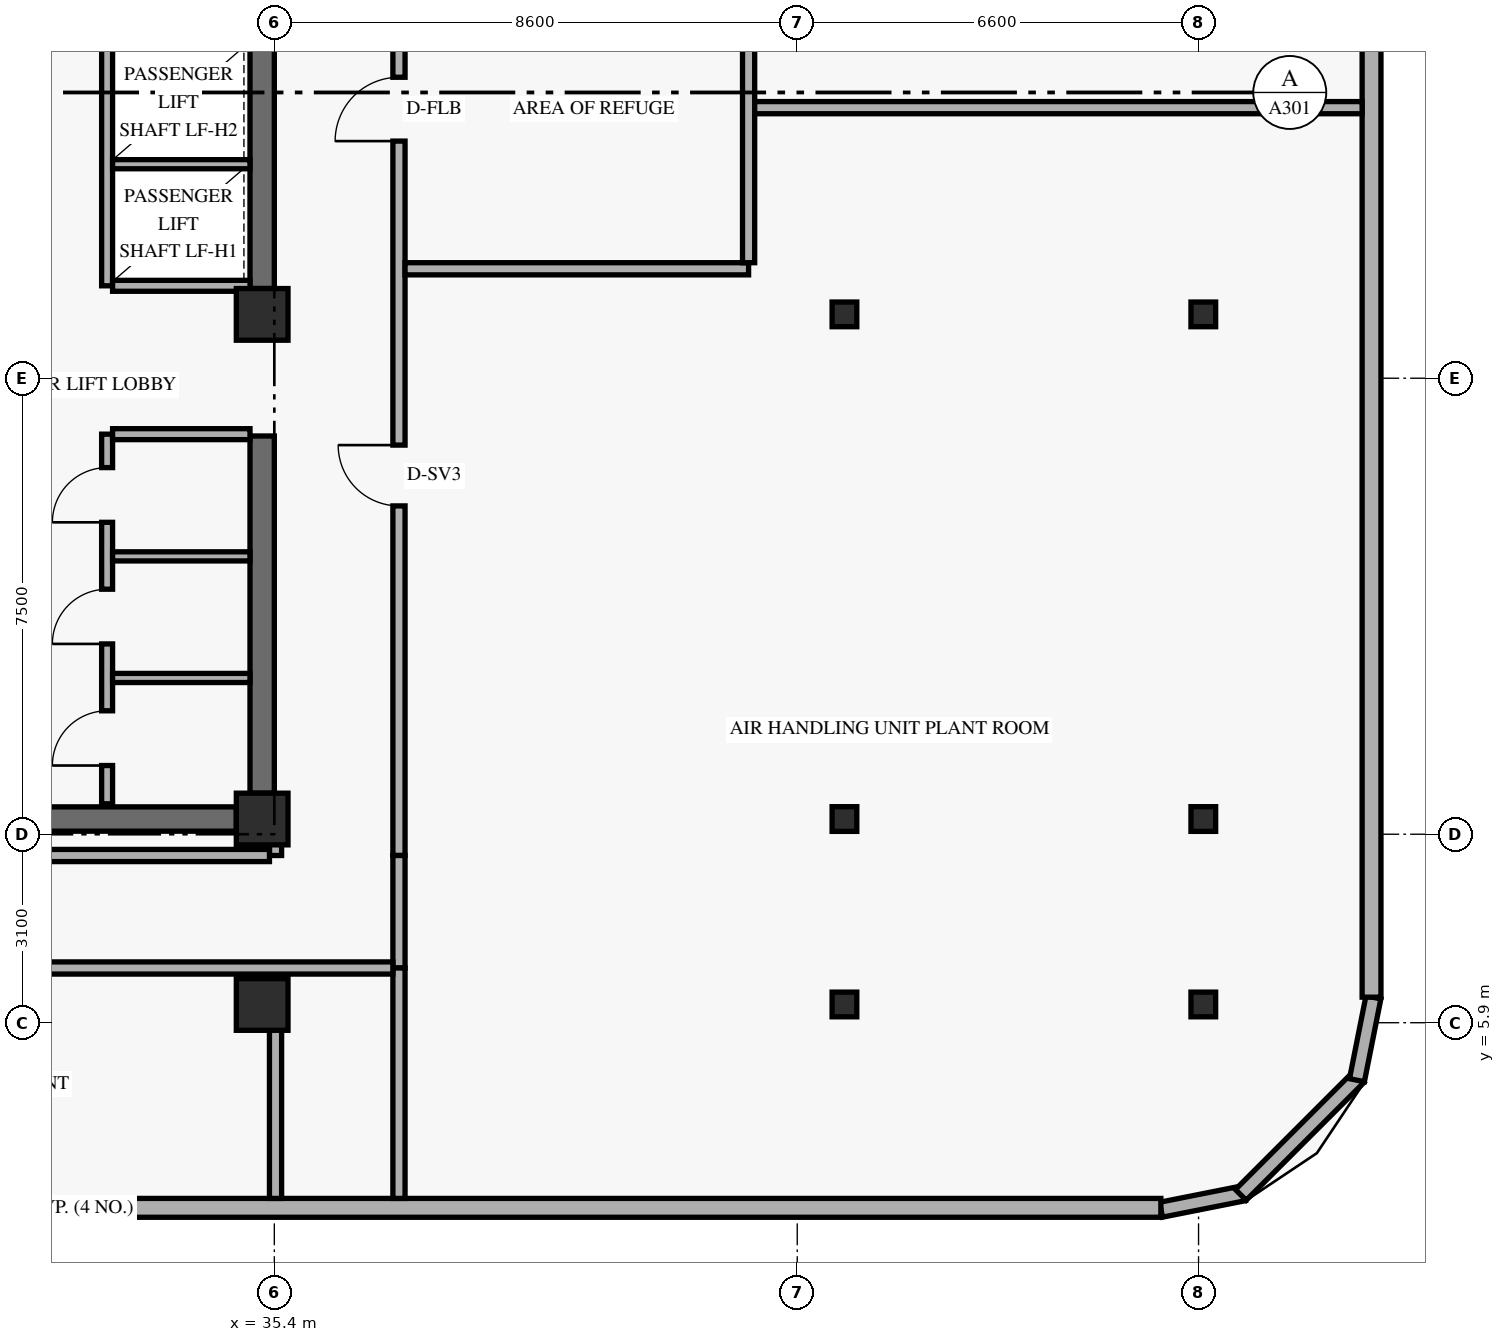
"""IFC4 building model, lengths in metres.
Left out: names, types, materials, properties, quantities, classifications, styles, units other than length and angle.
Written with IfcOpenShell. Run it as: python <this file> out.ifc"""

import sys

from ifc_helpers import new_model, si_unit, direction, frame, frame_2d, origin, origin_2d, place, context, subcontext, project, spatial, rectangle, hollow_rectangle, extrude, element, fill, save


model = new_model("IFC4")
c1 = context("Model", 3, precision=1e-05, world=origin(), true_north=direction((0.0, 1.0)))
c2 = subcontext(c1, "Body", "Model", "MODEL_VIEW")
j1 = project(units=[si_unit("LENGTHUNIT", "METRE"), si_unit("PLANEANGLEUNIT", "RADIAN")], contexts=[c1])
p1 = place(None, origin())
s1 = spatial("IfcSite", under=j1, at=p1, CompositionType="ELEMENT")
p2 = place(p1, origin())
s2 = spatial("IfcBuilding", under=s1, at=p2, CompositionType="ELEMENT")
p3 = place(p2, frame((0.0, 0.0, 135.6)))
s3 = spatial("IfcBuildingStorey", under=s2, at=p3, CompositionType="ELEMENT", Elevation=135.6)
p4 = place(p3, frame((35.2, 9.675, 0.0), z_axis=(0.0, 0.0, 1.0), x_axis=(0.0, 1.0, 0.0)))
e1 = element("IfcWall", 1, at=p4, inside=s3, PredefinedType="SHEAR", context=c2, shape_type="SweptSolid", body=[
    extrude(rectangle(XDim=5.875, YDim=0.4, at=frame_2d((2.938, 0.0))), origin(), (0.0, 0.0, 1.0), 4.549),
])
p5 = place(p3, frame((35.2, 17.975, 0.0), z_axis=(0.0, 0.0, 1.0), x_axis=(0.0, 1.0, 0.0)))
e2 = element("IfcWall", 2, at=p5, inside=s3, PredefinedType="SHEAR", context=c2, shape_type="SweptSolid", body=[
    extrude(rectangle(XDim=10.125, YDim=0.4, at=frame_2d((5.062, 0.0))), origin(), (0.0, 0.0, 1.0), 4.549),
])
p6 = place(p3, frame((24.625, 9.25, 0.0), z_axis=(0.0, 0.0, 1.0), x_axis=(1.0, 0.0, 0.0)))
e3 = element("IfcWall", 3, at=p6, inside=s3, PredefinedType="SHEAR", context=c2, shape_type="SweptSolid", body=[
    extrude(rectangle(XDim=10.15, YDim=0.4, at=frame_2d((5.075, 0.0))), origin(), (0.0, 0.0, 1.0), 5.16),
])
for number, where, z_axis, x_axis in (
    (4, (35.2, 6.2, 0.0), (0.0, 0.0, 1.0), (1.0, 0.0, 0.0)),
    (5, (35.2, 9.25, 0.0), (0.0, 0.0, 1.0), (1.0, 0.0, 0.0)),
    (6, (35.2, 17.55, 0.0), (0.0, 0.0, 1.0), (1.0, 0.0, 0.0)),
):
    element("IfcColumn", number, at=place(p3, frame(where, z_axis=z_axis, x_axis=x_axis)), inside=s3, PredefinedType="COLUMN", context=c2, shape_type="SweptSolid", body=[
        extrude(rectangle(XDim=0.85, YDim=0.85, at=origin_2d()), origin(), (0.0, 0.0, 1.0), 5.4),
    ])
for number, where, z_axis, x_axis in (
    (7, (44.682, 6.2, 0.0), (0.035, 0.0, 0.999), (0.0, 1.0, 0.0)),
    (8, (44.682, 9.25, 0.0), (0.035, 0.0, 0.999), (0.0, 1.0, 0.0)),
    (9, (44.682, 17.55, 0.0), (0.035, 0.0, 0.999), (0.0, 1.0, 0.0)),
):
    element("IfcColumn", number, at=place(p3, frame(where, z_axis=z_axis, x_axis=x_axis)), inside=s3, PredefinedType="COLUMN", context=c2, shape_type="SweptSolid", body=[
        extrude(hollow_rectangle(XDim=0.406, YDim=0.406, WallThickness=0.016, at=origin_2d()), origin(), (0.0, 0.0, 1.0), 5.403),
    ])
for number, where, z_axis, x_axis in (
    (10, (50.521, 6.2, 0.0), (0.058, 0.0, 0.998), (0.0, 1.0, 0.0)),
    (11, (50.521, 9.25, 0.0), (0.058, 0.0, 0.998), (0.0, 1.0, 0.0)),
    (12, (50.521, 17.55, 0.0), (0.058, 0.0, 0.998), (0.0, 1.0, 0.0)),
):
    element("IfcColumn", number, at=place(p3, frame(where, z_axis=z_axis, x_axis=x_axis)), inside=s3, PredefinedType="COLUMN", context=c2, shape_type="SweptSolid", body=[
        extrude(hollow_rectangle(XDim=0.406, YDim=0.406, WallThickness=0.016, at=origin_2d()), origin(), (0.0, 0.0, 1.0), 5.409),
    ])
p7 = place(p3, frame((49.983, 2.824, 0.0), z_axis=(0.0, 0.0, 1.0), x_axis=(0.980809899341, 0.19496651342, 0.0)))
e13 = element("IfcWall", 13, at=p7, inside=s3, PredefinedType="SOLIDWALL", context=c2, shape_type="SweptSolid", body=[
    extrude(rectangle(XDim=1.389, YDim=0.25, at=frame_2d((0.694, 0.0))), origin(), (0.0, 0.0, 1.0), 5.16),
])
p8 = place(p3, frame((51.295, 3.068, 0.0), z_axis=(0.0, 0.0, 1.0), x_axis=(0.707151344399, 0.707062215165, 0.0)))
e14 = element("IfcWall", 14, at=p8, inside=s3, PredefinedType="SOLIDWALL", context=c2, shape_type="SweptSolid", body=[
    extrude(rectangle(XDim=2.739, YDim=0.25, at=frame_2d((1.37, 0.0))), origin(), (0.0, 0.0, 1.0), 5.16),
])
p9 = place(p3, frame((53.205, 4.955, 0.0), z_axis=(0.0, 0.0, 1.0), x_axis=(0.195000137217, 0.980803214965, 0.0)))
e15 = element("IfcWall", 15, at=p9, inside=s3, PredefinedType="SOLIDWALL", context=c2, shape_type="SweptSolid", body=[
    extrude(rectangle(XDim=1.388, YDim=0.25, at=frame_2d((0.694, 0.0))), origin(), (0.0, 0.0, 1.0), 5.16),
])
p10 = place(p3, frame((13.42, 2.855, 0.0), z_axis=(0.0, 0.0, 1.0), x_axis=(1.0, 0.0, 0.0)))
e16 = element("IfcWall", 16, at=p10, inside=s3, PredefinedType="SOLIDWALL", context=c2, shape_type="SweptSolid", body=[
    extrude(rectangle(XDim=36.56, YDim=0.31, at=frame_2d((18.28, 0.0))), origin(), (0.0, 0.0, 1.0), 5.16),
])
p11 = place(p3, frame((53.445, 6.32, 0.0), z_axis=(0.0, 0.0, 1.0), x_axis=(0.0, 1.0, 0.0)))
e17 = element("IfcWall", 17, at=p11, inside=s3, PredefinedType="SOLIDWALL", context=c2, shape_type="SweptSolid", body=[
    extrude(rectangle(XDim=35.36, YDim=0.31, at=frame_2d((17.68, 0.0))), origin(), (0.0, 0.0, 1.0), 5.16),
])
p12 = place(p3, frame((32.65, 9.5, 0.0), z_axis=(0.0, 0.0, 1.0), x_axis=(0.0, 1.0, 0.0)))
e18 = element("IfcWall", 18, at=p12, inside=s3, PredefinedType="STANDARD", context=c2, shape_type="SweptSolid", body=[
    extrude(rectangle(XDim=6.08, YDim=0.18, at=frame_2d((3.04, 0.0))), origin(), (0.0, 0.0, 1.0), 5.16),
])
p13 = place(p12, frame((0.63, 0.0, 0.0)))
e19 = element("IfcOpeningElement", 19, at=p13, cuts=e18, PredefinedType="OPENING", context=c2, shape_type="SweptSolid", body=[
    extrude(rectangle(XDim=0.9, YDim=2.1, at=frame_2d((0.45, 1.05))), frame((0.0, 0.1, 0.0), z_axis=(0.0, -1.0, 0.0), x_axis=(1.0, 0.0, 0.0)), (0.0, 0.0, 1.0), 0.2),
])
p14 = place(p12, frame((2.63, 0.0, 0.0)))
e20 = element("IfcOpeningElement", 20, at=p14, cuts=e18, PredefinedType="OPENING", context=c2, shape_type="SweptSolid", body=[
    extrude(rectangle(XDim=0.9, YDim=2.1, at=frame_2d((0.45, 1.05))), frame((0.0, 0.1, 0.0), z_axis=(0.0, -1.0, 0.0), x_axis=(1.0, 0.0, 0.0)), (0.0, 0.0, 1.0), 0.2),
])
p15 = place(p12, frame((4.63, 0.0, 0.0)))
e21 = element("IfcOpeningElement", 21, at=p15, cuts=e18, PredefinedType="OPENING", context=c2, shape_type="SweptSolid", body=[
    extrude(rectangle(XDim=0.9, YDim=2.1, at=frame_2d((0.45, 1.05))), frame((0.0, 0.1, 0.0), z_axis=(0.0, -1.0, 0.0), x_axis=(1.0, 0.0, 0.0)), (0.0, 0.0, 1.0), 0.2),
])
p16 = place(p3, frame((32.74, 15.58, 0.0), z_axis=(0.0, 0.0, 1.0), x_axis=(1.0, 0.0, 0.0)))
e22 = element("IfcWall", 22, at=p16, inside=s3, PredefinedType="STANDARD", context=c2, shape_type="SweptSolid", body=[
    extrude(rectangle(XDim=2.26, YDim=0.18, at=frame_2d((1.13, 0.0))), origin(), (0.0, 0.0, 1.0), 5.16),
])
for number, where, z_axis, x_axis in (
    (23, (32.74, 11.57, 0.0), (0.0, 0.0, 1.0), (1.0, 0.0, 0.0)),
    (24, (32.74, 13.57, 0.0), (0.0, 0.0, 1.0), (1.0, 0.0, 0.0)),
):
    element("IfcWall", number, at=place(p3, frame(where, z_axis=z_axis, x_axis=x_axis)), inside=s3, PredefinedType="STANDARD", context=c2, shape_type="SweptSolid", body=[
        extrude(rectangle(XDim=2.26, YDim=0.15, at=frame_2d((1.13, 0.0))), origin(), (0.0, 0.0, 1.0), 5.16),
    ])
p17 = place(p3, frame((32.65, 18.02, 0.0), z_axis=(0.0, 0.0, 1.0), x_axis=(0.0, 1.0, 0.0)))
e25 = element("IfcWall", 25, at=p17, inside=s3, PredefinedType="STANDARD", context=c2, shape_type="SweptSolid", body=[
    extrude(rectangle(XDim=10.06, YDim=0.18, at=frame_2d((5.03, 0.0))), origin(), (0.0, 0.0, 1.0), 5.16),
])
p18 = place(p3, frame((32.74, 18.02, 0.0), z_axis=(0.0, 0.0, 1.0), x_axis=(1.0, 0.0, 0.0)))
e26 = element("IfcWall", 26, at=p18, inside=s3, PredefinedType="STANDARD", context=c2, shape_type="SweptSolid", body=[
    extrude(rectangle(XDim=2.26, YDim=0.18, at=frame_2d((1.13, 0.0))), origin(), (0.0, 0.0, 1.0), 5.16),
])
p19 = place(p3, frame((32.74, 20.02, 0.0), z_axis=(0.0, 0.0, 1.0), x_axis=(1.0, 0.0, 0.0)))
e27 = element("IfcWall", 27, at=p19, inside=s3, PredefinedType="STANDARD", context=c2, shape_type="SweptSolid", body=[
    extrude(rectangle(XDim=2.26, YDim=0.15, at=frame_2d((1.13, 0.0))), origin(), (0.0, 0.0, 1.0), 5.16),
])
p20 = place(p3, frame((37.45, 8.65, 0.0), z_axis=(0.0, 0.0, 1.0), x_axis=(0.0, 1.0, 0.0)))
e28 = element("IfcWall", 28, at=p20, inside=s3, PredefinedType="STANDARD", context=c2, shape_type="SweptSolid", body=[
    extrude(rectangle(XDim=30.7, YDim=0.2, at=frame_2d((15.35, 0.0))), origin(), (0.0, 0.0, 1.0), 4.531),
])
p21 = place(p20, frame((11.75, 0.0, 0.0)))
e29 = element("IfcOpeningElement", 29, at=p21, cuts=e28, PredefinedType="OPENING", context=c2, shape_type="SweptSolid", body=[
    extrude(rectangle(XDim=1.05, YDim=2.15, at=frame_2d((0.525, 1.075))), frame((0.0, 0.11, 0.0), z_axis=(0.0, -1.0, 0.0), x_axis=(1.0, 0.0, 0.0)), (0.0, 0.0, 1.0), 0.22),
])
p22 = place(p20, frame((5.75, 0.0, 0.0)))
e30 = element("IfcOpeningElement", 30, at=p22, cuts=e28, PredefinedType="OPENING", context=c2, shape_type="SweptSolid", body=[
    extrude(rectangle(XDim=1.0, YDim=2.15, at=frame_2d((0.5, 1.075))), frame((0.0, 0.11, 0.0), z_axis=(0.0, -1.0, 0.0), x_axis=(1.0, 0.0, 0.0)), (0.0, 0.0, 1.0), 0.22),
])
p23 = place(p20, frame((16.75, 0.0, 0.0)))
e31 = element("IfcOpeningElement", 31, at=p23, cuts=e28, PredefinedType="OPENING", context=c2, shape_type="SweptSolid", body=[
    extrude(rectangle(XDim=1.05, YDim=2.15, at=frame_2d((0.525, 1.075))), frame((0.0, 0.11, 0.0), z_axis=(0.0, -1.0, 0.0), x_axis=(1.0, 0.0, 0.0)), (0.0, 0.0, 1.0), 0.22),
])
p24 = place(p20, frame((23.25, 0.0, 0.0)))
e32 = element("IfcOpeningElement", 32, at=p24, cuts=e28, PredefinedType="OPENING", context=c2, shape_type="SweptSolid", body=[
    extrude(rectangle(XDim=1.05, YDim=2.15, at=frame_2d((0.525, 1.075))), frame((0.0, 0.11, 0.0), z_axis=(0.0, -1.0, 0.0), x_axis=(1.0, 0.0, 0.0)), (0.0, 0.0, 1.0), 0.22),
])
p25 = place(p20, frame((27.15, 0.0, 0.0)))
e33 = element("IfcOpeningElement", 33, at=p25, cuts=e28, PredefinedType="OPENING", context=c2, shape_type="SweptSolid", body=[
    extrude(rectangle(XDim=1.05, YDim=2.15, at=frame_2d((0.525, 1.075))), frame((0.0, 0.11, 0.0), z_axis=(0.0, -1.0, 0.0), x_axis=(1.0, 0.0, 0.0)), (0.0, 0.0, 1.0), 0.22),
])
p26 = place(p3, frame((37.45, 6.8, 0.0), z_axis=(0.0, 0.0, 1.0), x_axis=(0.0, 1.0, 0.0)))
e34 = element("IfcWall", 34, at=p26, inside=s3, PredefinedType="STANDARD", context=c2, shape_type="SweptSolid", body=[
    extrude(rectangle(XDim=1.85, YDim=0.2, at=frame_2d((0.925, 0.0))), origin(), (0.0, 0.0, 1.0), 5.16),
])
p27 = place(p3, frame((37.45, 3.01, 0.0), z_axis=(0.0, 0.0, 1.0), x_axis=(0.0, 1.0, 0.0)))
e35 = element("IfcWall", 35, at=p27, inside=s3, PredefinedType="STANDARD", context=c2, shape_type="SweptSolid", body=[
    extrude(rectangle(XDim=3.79, YDim=0.2, at=frame_2d((1.895, 0.0))), origin(), (0.0, 0.0, 1.0), 4.609),
])
p28 = place(p3, frame((35.42, 3.01, 0.0), z_axis=(0.0, 0.0, 1.0), x_axis=(0.0, 1.0, 0.0)))
e36 = element("IfcWall", 36, at=p28, inside=s3, PredefinedType="STANDARD", context=c2, shape_type="SweptSolid", body=[
    extrude(rectangle(XDim=3.79, YDim=0.2, at=frame_2d((1.895, 0.0))), origin(), (0.0, 0.0, 1.0), 4.531),
])
p29 = place(p3, frame((35.42, 8.65, 0.0), z_axis=(0.0, 0.0, 1.0), x_axis=(0.0, 1.0, 0.0)))
e37 = element("IfcWall", 37, at=p29, inside=s3, PredefinedType="STANDARD", context=c2, shape_type="SweptSolid", body=[
    extrude(rectangle(XDim=0.6, YDim=0.2, at=frame_2d((0.3, 0.0))), origin(), (0.0, 0.0, 1.0), 4.531),
])
p30 = place(p3, frame((37.55, 18.3, 0.0), z_axis=(0.0, 0.0, 1.0), x_axis=(1.0, 0.0, 0.0)))
e38 = element("IfcWall", 38, at=p30, inside=s3, PredefinedType="STANDARD", context=c2, shape_type="SweptSolid", body=[
    extrude(rectangle(XDim=5.65, YDim=0.2, at=frame_2d((2.825, 0.0))), origin(), (0.0, 0.0, 1.0), 5.16),
])
p31 = place(p3, frame((43.2, 18.4, 0.0), z_axis=(0.0, 0.0, 1.0), x_axis=(0.0, 1.0, 0.0)))
e39 = element("IfcWall", 39, at=p31, inside=s3, PredefinedType="STANDARD", context=c2, shape_type="SweptSolid", body=[
    extrude(rectangle(XDim=5.1, YDim=0.2, at=frame_2d((2.55, 0.0))), origin(), (0.0, 0.0, 1.0), 5.16),
])
p32 = place(p3, frame((43.3, 20.95, 0.0), z_axis=(0.0, 0.0, 1.0), x_axis=(1.0, 0.0, 0.0)))
e40 = element("IfcWall", 40, at=p32, inside=s3, PredefinedType="STANDARD", context=c2, shape_type="SweptSolid", body=[
    extrude(rectangle(XDim=9.99, YDim=0.2, at=frame_2d((4.995, 0.0))), origin(), (0.0, 0.0, 1.0), 4.531),
])
p33 = place(p3, frame((21.75, 6.8, 0.0), z_axis=(0.0, 0.0, 1.0), x_axis=(1.0, 0.0, 0.0)))
e41 = element("IfcWall", 41, at=p33, inside=s3, PredefinedType="STANDARD", context=c2, shape_type="SweptSolid", body=[
    extrude(rectangle(XDim=15.6, YDim=0.2, at=frame_2d((7.8, 0.0))), origin(), (0.0, 0.0, 1.0), 4.531),
])
p34 = place(p33, frame((5.1, 0.0, 0.0)))
e42 = element("IfcOpeningElement", 42, at=p34, cuts=e41, PredefinedType="OPENING", context=c2, shape_type="SweptSolid", body=[
    extrude(rectangle(XDim=0.9, YDim=2.1, at=frame_2d((0.45, 1.05))), frame((0.0, 0.11, 0.0), z_axis=(0.0, -1.0, 0.0), x_axis=(1.0, 0.0, 0.0)), (0.0, 0.0, 1.0), 0.22),
])
p35 = place(p3, frame((23.85, 8.65, 0.0), z_axis=(0.0, 0.0, 1.0), x_axis=(1.0, 0.0, 0.0)))
e43 = element("IfcWall", 43, at=p35, inside=s3, PredefinedType="STANDARD", context=c2, shape_type="SweptSolid", body=[
    extrude(rectangle(XDim=11.47, YDim=0.2, at=frame_2d((5.735, 0.0))), origin(), (0.0, 0.0, 1.0), 4.531),
])
p36 = place(p13, origin())
e44 = element("IfcDoor", 44, at=p36, inside=s3, OperationType="SINGLE_SWING_LEFT", PredefinedType="DOOR", context=c2, shape_type="SweptSolid", body=[
    extrude(rectangle(XDim=0.9, YDim=2.1, at=frame_2d((0.45, 1.05))), frame((0.0, 0.025, 0.0), z_axis=(0.0, -1.0, 0.0), x_axis=(1.0, 0.0, 0.0)), (0.0, 0.0, 1.0), 0.05),
])
fill(e19, e44)
p37 = place(p14, origin())
e45 = element("IfcDoor", 45, at=p37, inside=s3, OperationType="SINGLE_SWING_LEFT", PredefinedType="DOOR", context=c2, shape_type="SweptSolid", body=[
    extrude(rectangle(XDim=0.9, YDim=2.1, at=frame_2d((0.45, 1.05))), frame((0.0, 0.025, 0.0), z_axis=(0.0, -1.0, 0.0), x_axis=(1.0, 0.0, 0.0)), (0.0, 0.0, 1.0), 0.05),
])
fill(e20, e45)
p38 = place(p15, origin())
e46 = element("IfcDoor", 46, at=p38, inside=s3, OperationType="SINGLE_SWING_LEFT", PredefinedType="DOOR", context=c2, shape_type="SweptSolid", body=[
    extrude(rectangle(XDim=0.9, YDim=2.1, at=frame_2d((0.45, 1.05))), frame((0.0, 0.025, 0.0), z_axis=(0.0, -1.0, 0.0), x_axis=(1.0, 0.0, 0.0)), (0.0, 0.0, 1.0), 0.05),
])
fill(e21, e46)
p39 = place(p21, origin())
e47 = element("IfcDoor", 47, at=p39, inside=s3, OperationType="SINGLE_SWING_LEFT", PredefinedType="DOOR", context=c2, shape_type="SweptSolid", body=[
    extrude(rectangle(XDim=1.05, YDim=2.15, at=frame_2d((0.525, 1.075))), frame((0.0, 0.025, 0.0), z_axis=(0.0, -1.0, 0.0), x_axis=(1.0, 0.0, 0.0)), (0.0, 0.0, 1.0), 0.05),
])
fill(e29, e47)
p40 = place(p22, origin())
e48 = element("IfcDoor", 48, at=p40, inside=s3, OperationType="SINGLE_SWING_RIGHT", PredefinedType="DOOR", context=c2, shape_type="SweptSolid", body=[
    extrude(rectangle(XDim=1.0, YDim=2.15, at=frame_2d((0.5, 1.075))), frame((0.0, 0.025, 0.0), z_axis=(0.0, -1.0, 0.0), x_axis=(1.0, 0.0, 0.0)), (0.0, 0.0, 1.0), 0.05),
])
fill(e30, e48)
save(model, sys.argv[1])
